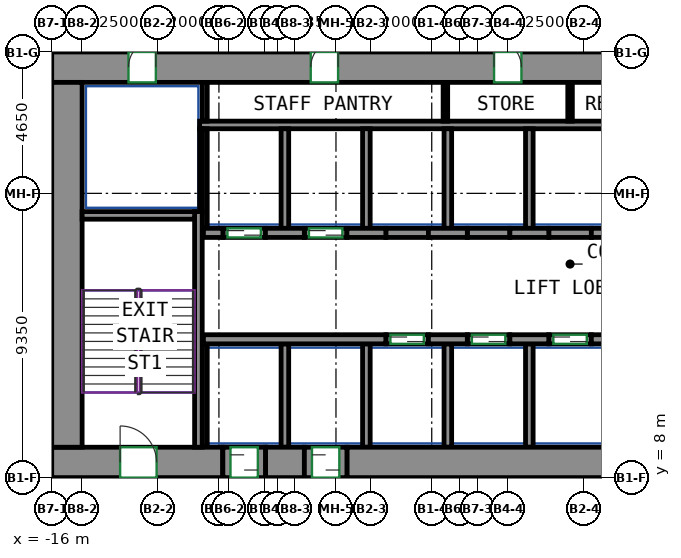
"""IFC4 building model, lengths in metres.
Left out: names, types, materials, properties, quantities, classifications, styles, units other than length and angle.
Written with IfcOpenShell. Run it as: python <this file> out.ifc"""

import sys

from ifc_helpers import new_model, si_unit, direction, frame, frame_2d, origin, place, context, subcontext, project, spatial, rectangle, extrude, source, transform, mapped, element, fill, save


model = new_model("IFC4")
c1 = context("Model", 3, precision=1e-05, world=origin(), true_north=direction((0.0, 1.0)))
c2 = subcontext(c1, "Body", "Model", "MODEL_VIEW")
j1 = project(units=[si_unit("LENGTHUNIT", "METRE"), si_unit("PLANEANGLEUNIT", "RADIAN")], contexts=[c1])
p1 = place(None, origin())
s1 = spatial("IfcSite", under=j1, at=p1, CompositionType="ELEMENT")
p2 = place(p1, origin())
s2 = spatial("IfcBuilding", under=s1, at=p2, CompositionType="ELEMENT")
p3 = place(p2, frame((0.0, 0.0, 18.0)))
s3 = spatial("IfcBuildingStorey", under=s2, at=p3, CompositionType="ELEMENT", Elevation=18.0)
m1 = source(origin(), c2, "Body", "SweptSolid", [
    extrude(rectangle(XDim=5.63, YDim=1.0, at=frame_2d((2.815, 0.0))), origin(), (0.0, 0.0, 1.0), 4.1),
])
p4 = place(p3, frame((-16.0, 8.5, 0.0), z_axis=(0.0, 0.0, 1.0), x_axis=(1.0, 0.0, 0.0)))
e1 = element("IfcWall", 1, at=p4, inside=s3, PredefinedType="SHEAR", context=c2, shape_type="MappedRepresentation", body=[
    mapped(m1, transform((0.0, 0.0, 0.0))),
])
p5 = place(p4, frame((2.25, 0.0, 0.0)))
e2 = element("IfcOpeningElement", 2, at=p5, cuts=e1, PredefinedType="OPENING", context=c2, shape_type="SweptSolid", body=[
    extrude(rectangle(XDim=1.2, YDim=2.1, at=frame_2d((0.6, 1.05))), frame((0.0, 0.51, 0.0), z_axis=(0.0, -1.0, 0.0), x_axis=(1.0, 0.0, 0.0)), (0.0, 0.0, 1.0), 1.02),
])
m2 = source(origin(), c2, "Body", "SweptSolid", [
    extrude(rectangle(XDim=1.28, YDim=1.0, at=frame_2d((0.64, 0.0))), origin(), (0.0, 0.0, 1.0), 4.1),
])
p6 = place(p3, frame((-8.97, 8.5, 0.0), z_axis=(0.0, 0.0, 1.0), x_axis=(1.0, 0.0, 0.0)))
e3 = element("IfcWall", 3, at=p6, inside=s3, PredefinedType="SHEAR", context=c2, shape_type="MappedRepresentation", body=[
    mapped(m2, transform((0.0, 0.0, 0.0))),
])
m3 = source(origin(), c2, "Body", "SweptSolid", [
    extrude(rectangle(XDim=14.18, YDim=1.0, at=frame_2d((7.09, 0.0))), origin(), (0.0, 0.0, 1.0), 4.1),
])
p7 = place(p3, frame((-6.29, 8.5, 0.0), z_axis=(0.0, 0.0, 1.0), x_axis=(1.0, 0.0, 0.0)))
e4 = element("IfcWall", 4, at=p7, inside=s3, PredefinedType="SHEAR", context=c2, shape_type="MappedRepresentation", body=[
    mapped(m3, transform((0.0, 0.0, 0.0))),
])
m4 = source(origin(), c2, "Body", "SweptSolid", [
    extrude(rectangle(XDim=34.1, YDim=1.0, at=frame_2d((17.05, 0.0))), origin(), (0.0, 0.0, 1.0), 4.1),
])
p8 = place(p3, frame((-16.0, 21.5, 0.0), z_axis=(0.0, 0.0, 1.0), x_axis=(1.0, 0.0, 0.0)))
e5 = element("IfcWall", 5, at=p8, inside=s3, PredefinedType="SHEAR", context=c2, shape_type="MappedRepresentation", body=[
    mapped(m4, transform((0.0, 0.0, 0.0))),
])
p9 = place(p8, frame((8.52, 0.0, 0.0)))
e6 = element("IfcOpeningElement", 6, at=p9, cuts=e5, PredefinedType="OPENING", context=c2, shape_type="SweptSolid", body=[
    extrude(rectangle(XDim=0.9, YDim=2.1, at=frame_2d((0.45, 1.05))), frame((0.0, 0.51, 0.0), z_axis=(0.0, -1.0, 0.0), x_axis=(1.0, 0.0, 0.0)), (0.0, 0.0, 1.0), 1.02),
])
p10 = place(p8, frame((14.55, 0.0, 0.0)))
e7 = element("IfcOpeningElement", 7, at=p10, cuts=e5, PredefinedType="OPENING", context=c2, shape_type="SweptSolid", body=[
    extrude(rectangle(XDim=0.9, YDim=2.1, at=frame_2d((0.45, 1.05))), frame((0.0, 0.51, 0.0), z_axis=(0.0, -1.0, 0.0), x_axis=(1.0, 0.0, 0.0)), (0.0, 0.0, 1.0), 1.02),
])
p11 = place(p8, frame((19.374, 0.0, 0.0)))
e8 = element("IfcOpeningElement", 8, at=p11, cuts=e5, PredefinedType="OPENING", context=c2, shape_type="SweptSolid", body=[
    extrude(rectangle(XDim=0.9, YDim=2.1, at=frame_2d((0.45, 1.05))), frame((0.0, 0.51, 0.0), z_axis=(0.0, -1.0, 0.0), x_axis=(1.0, 0.0, 0.0)), (0.0, 0.0, 1.0), 1.02),
])
p12 = place(p8, frame((25.404, 0.0, 0.0)))
e9 = element("IfcOpeningElement", 9, at=p12, cuts=e5, PredefinedType="OPENING", context=c2, shape_type="SweptSolid", body=[
    extrude(rectangle(XDim=0.9, YDim=2.1, at=frame_2d((0.45, 1.05))), frame((0.0, 0.51, 0.0), z_axis=(0.0, -1.0, 0.0), x_axis=(1.0, 0.0, 0.0)), (0.0, 0.0, 1.0), 1.02),
])
p13 = place(p8, frame((2.525, 0.0, 0.0)))
e10 = element("IfcOpeningElement", 10, at=p13, cuts=e5, PredefinedType="OPENING", context=c2, shape_type="SweptSolid", body=[
    extrude(rectangle(XDim=0.9, YDim=2.1, at=frame_2d((0.45, 1.05))), frame((0.0, 0.51, 0.0), z_axis=(0.0, -1.0, 0.0), x_axis=(1.0, 0.0, 0.0)), (0.0, 0.0, 1.0), 1.02),
])
p14 = place(p8, frame((30.675, 0.0, 0.0)))
e11 = element("IfcOpeningElement", 11, at=p14, cuts=e5, PredefinedType="OPENING", context=c2, shape_type="SweptSolid", body=[
    extrude(rectangle(XDim=0.9, YDim=2.1, at=frame_2d((0.45, 1.05))), frame((0.0, 0.51, 0.0), z_axis=(0.0, -1.0, 0.0), x_axis=(1.0, 0.0, 0.0)), (0.0, 0.0, 1.0), 1.02),
])
m5 = source(origin(), c2, "Body", "SweptSolid", [
    extrude(rectangle(XDim=12.0, YDim=1.0, at=frame_2d((6.0, 0.0))), origin(), (0.0, 0.0, 1.0), 4.1),
])
p15 = place(p3, frame((-15.5, 9.0, 0.0), z_axis=(0.0, 0.0, 1.0), x_axis=(0.0, 1.0, 0.0)))
e12 = element("IfcWall", 12, at=p15, inside=s3, PredefinedType="SHEAR", context=c2, shape_type="MappedRepresentation", body=[
    mapped(m5, transform((0.0, 0.0, 0.0))),
])
m6 = source(origin(), c2, "Body", "SweptSolid", [
    extrude(rectangle(XDim=7.75, YDim=0.25, at=frame_2d((3.875, 0.0))), origin(), (0.0, 0.0, 1.0), 4.1),
])
p16 = place(p3, frame((-11.175, 9.0, 0.0), z_axis=(0.0, 0.0, 1.0), x_axis=(0.0, 1.0, 0.0)))
e13 = element("IfcWall", 13, at=p16, inside=s3, PredefinedType="SHEAR", context=c2, shape_type="MappedRepresentation", body=[
    mapped(m6, transform((0.0, 0.0, 0.0))),
])
m7 = source(origin(), c2, "Body", "SweptSolid", [
    extrude(rectangle(XDim=3.7, YDim=0.25, at=frame_2d((1.85, 0.0))), origin(), (0.0, 0.0, 1.0), 4.1),
])
p17 = place(p3, frame((-15.0, 16.625, 0.0), z_axis=(0.0, 0.0, 1.0), x_axis=(1.0, 0.0, 0.0)))
e14 = element("IfcWall", 14, at=p17, inside=s3, PredefinedType="SHEAR", context=c2, shape_type="MappedRepresentation", body=[
    mapped(m7, transform((0.0, 0.0, 0.0))),
])
m8 = source(origin(), c2, "Body", "SweptSolid", [
    extrude(rectangle(XDim=6.0, YDim=0.3, at=frame_2d((3.0, 0.0))), origin(), (0.0, 0.0, 1.0), 4.1),
])
p18 = place(p3, frame((-11.01, 12.55, 0.0), z_axis=(0.0, 0.0, 1.0), x_axis=(1.0, 0.0, 0.0)))
e15 = element("IfcWall", 15, at=p18, inside=s3, PredefinedType="SHEAR", context=c2, shape_type="MappedRepresentation", body=[
    mapped(m8, transform((0.0, 0.0, 0.0))),
])
m9 = source(origin(), c2, "Body", "SweptSolid", [
    extrude(rectangle(XDim=1.28, YDim=0.3, at=frame_2d((0.64, 0.0))), origin(), (0.0, 0.0, 1.0), 4.1),
])
for number, where, z_axis, x_axis in (
    (16, (-3.61, 12.55, 0.0), (0.0, 0.0, 1.0), (1.0, 0.0, 0.0)),
    (17, (-0.93, 12.55, 0.0), (0.0, 0.0, 1.0), (1.0, 0.0, 0.0)),
    (18, (1.75, 12.55, 0.0), (0.0, 0.0, 1.0), (1.0, 0.0, 0.0)),
):
    element("IfcWall", number, at=place(p3, frame(where, z_axis=z_axis, x_axis=x_axis)), inside=s3, PredefinedType="SHEAR", context=c2, shape_type="MappedRepresentation", body=[
        mapped(m9, transform((0.0, 0.0, 0.0))),
    ])
m10 = source(origin(), c2, "Body", "SweptSolid", [
    extrude(rectangle(XDim=0.64, YDim=0.3, at=frame_2d((0.32, 0.0))), origin(), (0.0, 0.0, 1.0), 4.1),
])
p19 = place(p3, frame((-11.01, 16.05, 0.0), z_axis=(0.0, 0.0, 1.0), x_axis=(1.0, 0.0, 0.0)))
e19 = element("IfcWall", 19, at=p19, inside=s3, PredefinedType="SHEAR", context=c2, shape_type="MappedRepresentation", body=[
    mapped(m10, transform((0.0, 0.0, 0.0))),
])
for number, where, z_axis, x_axis in (
    (20, (-8.97, 16.05, 0.0), (0.0, 0.0, 1.0), (1.0, 0.0, 0.0)),
    (21, (-6.29, 16.05, 0.0), (0.0, 0.0, 1.0), (1.0, 0.0, 0.0)),
    (22, (-3.61, 16.05, 0.0), (0.0, 0.0, 1.0), (1.0, 0.0, 0.0)),
    (23, (-0.93, 16.05, 0.0), (0.0, 0.0, 1.0), (1.0, 0.0, 0.0)),
    (24, (1.75, 16.05, 0.0), (0.0, 0.0, 1.0), (1.0, 0.0, 0.0)),
):
    element("IfcWall", number, at=place(p3, frame(where, z_axis=z_axis, x_axis=x_axis)), inside=s3, PredefinedType="SHEAR", context=c2, shape_type="MappedRepresentation", body=[
        mapped(m9, transform((0.0, 0.0, 0.0))),
    ])
m11 = source(origin(), c2, "Body", "SweptSolid", [
    extrude(rectangle(XDim=1.4, YDim=1.0, at=frame_2d((0.7, 0.0))), origin(), (0.0, 0.0, 1.0), 0.2),
])
p20 = place(p3, frame((-10.37, 8.5, 3.9), z_axis=(0.0, 0.0, 1.0), x_axis=(1.0, 0.0, 0.0)))
e25 = element("IfcWall", 25, at=p20, inside=s3, PredefinedType="SHEAR", context=c2, shape_type="MappedRepresentation", body=[
    mapped(m11, transform((0.0, 0.0, 0.0))),
])
m12 = source(origin(), c2, "Body", "SweptSolid", [
    extrude(rectangle(XDim=1.4, YDim=0.3, at=frame_2d((0.7, 0.0))), origin(), (0.0, 0.0, 1.0), 4.1),
])
p21 = place(p3, frame((-5.01, 12.55, 0.0), z_axis=(0.0, 0.0, 1.0), x_axis=(1.0, 0.0, 0.0)))
e26 = element("IfcWall", 26, at=p21, inside=s3, PredefinedType="PARTITIONING", context=c2, shape_type="MappedRepresentation", body=[
    mapped(m12, transform((0.0, 0.0, 0.0))),
])
p22 = place(p21, frame((0.15, 0.0, 0.0)))
e27 = element("IfcOpeningElement", 27, at=p22, cuts=e26, PredefinedType="OPENING", context=c2, shape_type="SweptSolid", body=[
    extrude(rectangle(XDim=1.1, YDim=2.1, at=frame_2d((0.55, 1.05))), frame((0.0, 0.16, 0.0), z_axis=(0.0, -1.0, 0.0), x_axis=(1.0, 0.0, 0.0)), (0.0, 0.0, 1.0), 0.32),
])
m13 = source(origin(), c2, "Body", "SweptSolid", [
    extrude(rectangle(XDim=1.4, YDim=0.3, at=frame_2d((0.7, 0.0))), origin(), (0.0, 0.0, 1.0), 4.1),
])
p23 = place(p3, frame((-2.33, 12.55, 0.0), z_axis=(0.0, 0.0, 1.0), x_axis=(1.0, 0.0, 0.0)))
e28 = element("IfcWall", 28, at=p23, inside=s3, PredefinedType="PARTITIONING", context=c2, shape_type="MappedRepresentation", body=[
    mapped(m13, transform((0.0, 0.0, 0.0))),
])
p24 = place(p23, frame((0.15, 0.0, 0.0)))
e29 = element("IfcOpeningElement", 29, at=p24, cuts=e28, PredefinedType="OPENING", context=c2, shape_type="SweptSolid", body=[
    extrude(rectangle(XDim=1.1, YDim=2.1, at=frame_2d((0.55, 1.05))), frame((0.0, 0.16, 0.0), z_axis=(0.0, -1.0, 0.0), x_axis=(1.0, 0.0, 0.0)), (0.0, 0.0, 1.0), 0.32),
])
p25 = place(p3, frame((0.35, 12.55, 0.0), z_axis=(0.0, 0.0, 1.0), x_axis=(1.0, 0.0, 0.0)))
e30 = element("IfcWall", 30, at=p25, inside=s3, PredefinedType="PARTITIONING", context=c2, shape_type="MappedRepresentation", body=[
    mapped(m12, transform((0.0, 0.0, 0.0))),
])
p26 = place(p25, frame((0.15, 0.0, 0.0)))
e31 = element("IfcOpeningElement", 31, at=p26, cuts=e30, PredefinedType="OPENING", context=c2, shape_type="SweptSolid", body=[
    extrude(rectangle(XDim=1.1, YDim=2.1, at=frame_2d((0.55, 1.05))), frame((0.0, 0.16, 0.0), z_axis=(0.0, -1.0, 0.0), x_axis=(1.0, 0.0, 0.0)), (0.0, 0.0, 1.0), 0.32),
])
p27 = place(p3, frame((-10.37, 16.05, 0.0), z_axis=(0.0, 0.0, 1.0), x_axis=(1.0, 0.0, 0.0)))
e32 = element("IfcWall", 32, at=p27, inside=s3, PredefinedType="PARTITIONING", context=c2, shape_type="MappedRepresentation", body=[
    mapped(m13, transform((0.0, 0.0, 0.0))),
])
p28 = place(p27, frame((0.15, 0.0, 0.0)))
e33 = element("IfcOpeningElement", 33, at=p28, cuts=e32, PredefinedType="OPENING", context=c2, shape_type="SweptSolid", body=[
    extrude(rectangle(XDim=1.1, YDim=2.1, at=frame_2d((0.55, 1.05))), frame((0.0, 0.16, 0.0), z_axis=(0.0, -1.0, 0.0), x_axis=(1.0, 0.0, 0.0)), (0.0, 0.0, 1.0), 0.32),
])
p29 = place(p3, frame((-7.69, 16.05, 0.0), z_axis=(0.0, 0.0, 1.0), x_axis=(1.0, 0.0, 0.0)))
e34 = element("IfcWall", 34, at=p29, inside=s3, PredefinedType="PARTITIONING", context=c2, shape_type="MappedRepresentation", body=[
    mapped(m12, transform((0.0, 0.0, 0.0))),
])
p30 = place(p29, frame((0.15, 0.0, 0.0)))
e35 = element("IfcOpeningElement", 35, at=p30, cuts=e34, PredefinedType="OPENING", context=c2, shape_type="SweptSolid", body=[
    extrude(rectangle(XDim=1.1, YDim=2.1, at=frame_2d((0.55, 1.05))), frame((0.0, 0.16, 0.0), z_axis=(0.0, -1.0, 0.0), x_axis=(1.0, 0.0, 0.0)), (0.0, 0.0, 1.0), 0.32),
])
p31 = place(p3, frame((-5.01, 16.05, 0.0), z_axis=(0.0, 0.0, 1.0), x_axis=(1.0, 0.0, 0.0)))
e36 = element("IfcWall", 36, at=p31, inside=s3, PredefinedType="PARTITIONING", context=c2, shape_type="MappedRepresentation", body=[
    mapped(m12, transform((0.0, 0.0, 0.0))),
])
p32 = place(p3, frame((-2.33, 16.05, 0.0), z_axis=(0.0, 0.0, 1.0), x_axis=(1.0, 0.0, 0.0)))
e37 = element("IfcWall", 37, at=p32, inside=s3, PredefinedType="PARTITIONING", context=c2, shape_type="MappedRepresentation", body=[
    mapped(m13, transform((0.0, 0.0, 0.0))),
])
p33 = place(p3, frame((0.35, 16.05, 0.0), z_axis=(0.0, 0.0, 1.0), x_axis=(1.0, 0.0, 0.0)))
e38 = element("IfcWall", 38, at=p33, inside=s3, PredefinedType="PARTITIONING", context=c2, shape_type="MappedRepresentation", body=[
    mapped(m12, transform((0.0, 0.0, 0.0))),
])
m14 = source(origin(), c2, "Body", "SweptSolid", [
    extrude(rectangle(XDim=24.37, YDim=0.25, at=frame_2d((12.185, 0.0))), origin(), (0.0, 0.0, 1.0), 4.1),
])
p34 = place(p3, frame((-11.135, 19.6, 0.0), z_axis=(0.0, 0.0, 1.0), x_axis=(1.0, 0.0, 0.0)))
e39 = element("IfcWall", 39, at=p34, inside=s3, PredefinedType="PARTITIONING", context=c2, shape_type="MappedRepresentation", body=[
    mapped(m14, transform((0.0, 0.0, 0.0))),
])
m15 = source(origin(), c2, "Body", "SweptSolid", [
    extrude(rectangle(XDim=3.275, YDim=0.165, at=frame_2d((1.638, 0.0))), origin(), (0.0, 0.0, 1.0), 4.1),
])
p35 = place(p3, frame((-10.968, 16.2, 0.0), z_axis=(0.0, 0.0, 1.0), x_axis=(0.0, 1.0, 0.0)))
e40 = element("IfcWall", 40, at=p35, inside=s3, PredefinedType="PARTITIONING", context=c2, shape_type="MappedRepresentation", body=[
    mapped(m15, transform((0.0, 0.0, 0.0))),
])
m16 = source(origin(), c2, "Body", "SweptSolid", [
    extrude(rectangle(XDim=1.275, YDim=0.165, at=frame_2d((0.637, 0.0))), origin(), (0.0, 0.0, 1.0), 4.1),
])
p36 = place(p3, frame((-10.968, 19.725, 0.0), z_axis=(0.0, 0.0, 1.0), x_axis=(0.0, 1.0, 0.0)))
e41 = element("IfcWall", 41, at=p36, inside=s3, PredefinedType="PARTITIONING", context=c2, shape_type="MappedRepresentation", body=[
    mapped(m16, transform((0.0, 0.0, 0.0))),
])
m17 = source(origin(), c2, "Body", "SweptSolid", [
    extrude(rectangle(XDim=3.275, YDim=0.25, at=frame_2d((1.638, 0.0))), origin(), (0.0, 0.0, 1.0), 4.1),
])
p37 = place(p3, frame((-0.29, 16.2, 0.0), z_axis=(0.0, 0.0, 1.0), x_axis=(0.0, 1.0, 0.0)))
e42 = element("IfcWall", 42, at=p37, inside=s3, PredefinedType="PARTITIONING", context=c2, shape_type="MappedRepresentation", body=[
    mapped(m17, transform((0.0, 0.0, 0.0))),
])
m18 = source(origin(), c2, "Body", "SweptSolid", [
    extrude(rectangle(XDim=2.725, YDim=0.085, at=frame_2d((1.363, 0.0))), origin(), (0.0, 0.0, 1.0), 4.1),
])
p38 = place(p3, frame((-11.093, 16.75, 0.0), z_axis=(0.0, 0.0, 1.0), x_axis=(0.0, 1.0, 0.0)))
e43 = element("IfcWall", 43, at=p38, inside=s3, PredefinedType="PARTITIONING", context=c2, shape_type="MappedRepresentation", body=[
    mapped(m18, transform((0.0, 0.0, 0.0))),
])
for number, where, z_axis, x_axis in (
    (44, (-2.97, 16.2, 0.0), (0.0, 0.0, 1.0), (0.0, 1.0, 0.0)),
    (45, (-5.65, 16.2, 0.0), (0.0, 0.0, 1.0), (0.0, 1.0, 0.0)),
    (46, (-8.33, 16.2, 0.0), (0.0, 0.0, 1.0), (0.0, 1.0, 0.0)),
):
    element("IfcWall", number, at=place(p3, frame(where, z_axis=z_axis, x_axis=x_axis)), inside=s3, PredefinedType="PARTITIONING", context=c2, shape_type="MappedRepresentation", body=[
        mapped(m17, transform((0.0, 0.0, 0.0))),
    ])
m19 = source(origin(), c2, "Body", "SweptSolid", [
    extrude(rectangle(XDim=3.4, YDim=0.25, at=frame_2d((1.7, 0.0))), origin(), (0.0, 0.0, 1.0), 4.1),
])
p39 = place(p3, frame((-0.29, 9.0, 0.0), z_axis=(0.0, 0.0, 1.0), x_axis=(0.0, 1.0, 0.0)))
e47 = element("IfcWall", 47, at=p39, inside=s3, PredefinedType="PARTITIONING", context=c2, shape_type="MappedRepresentation", body=[
    mapped(m19, transform((0.0, 0.0, 0.0))),
])
m20 = source(origin(), c2, "Body", "SweptSolid", [
    extrude(rectangle(XDim=3.4, YDim=0.165, at=frame_2d((1.7, 0.0))), origin(), (0.0, 0.0, 1.0), 4.1),
])
p40 = place(p3, frame((-10.968, 9.0, 0.0), z_axis=(0.0, 0.0, 1.0), x_axis=(0.0, 1.0, 0.0)))
e48 = element("IfcWall", 48, at=p40, inside=s3, PredefinedType="PARTITIONING", context=c2, shape_type="MappedRepresentation", body=[
    mapped(m20, transform((0.0, 0.0, 0.0))),
])
for number, where, z_axis, x_axis in (
    (49, (-2.97, 9.0, 0.0), (0.0, 0.0, 1.0), (0.0, 1.0, 0.0)),
    (50, (-5.65, 9.0, 0.0), (0.0, 0.0, 1.0), (0.0, 1.0, 0.0)),
    (51, (-8.33, 9.0, 0.0), (0.0, 0.0, 1.0), (0.0, 1.0, 0.0)),
):
    element("IfcWall", number, at=place(p3, frame(where, z_axis=z_axis, x_axis=x_axis)), inside=s3, PredefinedType="PARTITIONING", context=c2, shape_type="MappedRepresentation", body=[
        mapped(m19, transform((0.0, 0.0, 0.0))),
    ])
m21 = source(origin(), c2, "Body", "SweptSolid", [
    extrude(rectangle(XDim=1.275, YDim=0.15, at=frame_2d((0.637, 0.0))), origin(), (0.0, 0.0, 1.0), 4.1),
])
for number, where, z_axis, x_axis in (
    (52, (-3.05, 19.725, 0.0), (0.0, 0.0, 1.0), (0.0, 1.0, 0.0)),
    (53, (1.05, 19.725, 0.0), (0.0, 0.0, 1.0), (0.0, 1.0, 0.0)),
):
    element("IfcWall", number, at=place(p3, frame(where, z_axis=z_axis, x_axis=x_axis)), inside=s3, PredefinedType="PARTITIONING", context=c2, shape_type="MappedRepresentation", body=[
        mapped(m21, transform((0.0, 0.0, 0.0))),
    ])
m22 = source(origin(), c2, "Body", "SweptSolid", [
    extrude(rectangle(XDim=1.4, YDim=1.0, at=frame_2d((0.7, 0.0))), origin(), (0.0, 0.0, 1.0), 2.7),
])
p41 = place(p3, frame((-10.37, 8.5, 0.0), z_axis=(0.0, 0.0, 1.0), x_axis=(1.0, 0.0, 0.0)))
e54 = element("IfcWall", 54, at=p41, inside=s3, PredefinedType="PARTITIONING", context=c2, shape_type="MappedRepresentation", body=[
    mapped(m22, transform((0.0, 0.0, 0.0))),
])
p42 = place(p41, frame((0.25, 0.0, 0.0)))
e55 = element("IfcOpeningElement", 55, at=p42, cuts=e54, PredefinedType="OPENING", context=c2, shape_type="SweptSolid", body=[
    extrude(rectangle(XDim=0.9, YDim=2.1, at=frame_2d((0.45, 1.05))), frame((0.0, 0.51, 0.0), z_axis=(0.0, -1.0, 0.0), x_axis=(1.0, 0.0, 0.0)), (0.0, 0.0, 1.0), 1.02),
])
m23 = source(origin(), c2, "Body", "SweptSolid", [
    extrude(rectangle(XDim=1.4, YDim=1.0, at=frame_2d((0.7, 0.0))), origin(), (0.0, 0.0, 1.0), 2.7),
])
p43 = place(p3, frame((-7.69, 8.5, 0.0), z_axis=(0.0, 0.0, 1.0), x_axis=(1.0, 0.0, 0.0)))
e56 = element("IfcWall", 56, at=p43, inside=s3, PredefinedType="PARTITIONING", context=c2, shape_type="MappedRepresentation", body=[
    mapped(m23, transform((0.0, 0.0, 0.0))),
])
p44 = place(p43, frame((0.25, 0.0, 0.0)))
e57 = element("IfcOpeningElement", 57, at=p44, cuts=e56, PredefinedType="OPENING", context=c2, shape_type="SweptSolid", body=[
    extrude(rectangle(XDim=0.9, YDim=2.1, at=frame_2d((0.45, 1.05))), frame((0.0, 0.51, 0.0), z_axis=(0.0, -1.0, 0.0), x_axis=(1.0, 0.0, 0.0)), (0.0, 0.0, 1.0), 1.02),
])
p45 = place(p42, origin())
e58 = element("IfcDoor", 58, at=p45, inside=s3, OperationType="SLIDING_TO_LEFT", PredefinedType="DOOR", context=c2, shape_type="SweptSolid", body=[
    extrude(rectangle(XDim=0.9, YDim=2.1, at=frame_2d((0.45, 1.05))), frame((0.0, 0.405, 0.0), z_axis=(0.0, -1.0, 0.0), x_axis=(1.0, 0.0, 0.0)), (0.0, 0.0, 1.0), 0.05),
])
fill(e55, e58)
p46 = place(p44, origin())
e59 = element("IfcDoor", 59, at=p46, inside=s3, OperationType="SLIDING_TO_RIGHT", PredefinedType="DOOR", context=c2, shape_type="SweptSolid", body=[
    extrude(rectangle(XDim=0.9, YDim=2.1, at=frame_2d((0.45, 1.05))), frame((0.0, 0.405, 0.0), z_axis=(0.0, -1.0, 0.0), x_axis=(1.0, 0.0, 0.0)), (0.0, 0.0, 1.0), 0.05),
])
fill(e57, e59)
p47 = place(p22, origin())
e60 = element("IfcDoor", 60, at=p47, inside=s3, OperationType="DOUBLE_DOOR_SLIDING", PredefinedType="DOOR", context=c2, shape_type="SweptSolid", body=[
    extrude(rectangle(XDim=1.1, YDim=2.1, at=frame_2d((0.55, 1.05))), frame((0.0, 0.025, 0.0), z_axis=(0.0, -1.0, 0.0), x_axis=(1.0, 0.0, 0.0)), (0.0, 0.0, 1.0), 0.05),
])
fill(e27, e60)
p48 = place(p24, origin())
e61 = element("IfcDoor", 61, at=p48, inside=s3, OperationType="DOUBLE_DOOR_SLIDING", PredefinedType="DOOR", context=c2, shape_type="SweptSolid", body=[
    extrude(rectangle(XDim=1.1, YDim=2.1, at=frame_2d((0.55, 1.05))), frame((0.0, 0.025, 0.0), z_axis=(0.0, -1.0, 0.0), x_axis=(1.0, 0.0, 0.0)), (0.0, 0.0, 1.0), 0.05),
])
fill(e29, e61)
p49 = place(p26, origin())
e62 = element("IfcDoor", 62, at=p49, inside=s3, OperationType="DOUBLE_DOOR_SLIDING", PredefinedType="DOOR", context=c2, shape_type="SweptSolid", body=[
    extrude(rectangle(XDim=1.1, YDim=2.1, at=frame_2d((0.55, 1.05))), frame((0.0, 0.025, 0.0), z_axis=(0.0, -1.0, 0.0), x_axis=(1.0, 0.0, 0.0)), (0.0, 0.0, 1.0), 0.05),
])
fill(e31, e62)
p50 = place(p28, origin())
e63 = element("IfcDoor", 63, at=p50, inside=s3, OperationType="DOUBLE_DOOR_SLIDING", PredefinedType="DOOR", context=c2, shape_type="SweptSolid", body=[
    extrude(rectangle(XDim=1.1, YDim=2.1, at=frame_2d((0.55, 1.05))), frame((0.0, 0.025, 0.0), z_axis=(0.0, -1.0, 0.0), x_axis=(1.0, 0.0, 0.0)), (0.0, 0.0, 1.0), 0.05),
])
fill(e33, e63)
p51 = place(p30, origin())
e64 = element("IfcDoor", 64, at=p51, inside=s3, OperationType="DOUBLE_DOOR_SLIDING", PredefinedType="DOOR", context=c2, shape_type="SweptSolid", body=[
    extrude(rectangle(XDim=1.1, YDim=2.1, at=frame_2d((0.55, 1.05))), frame((0.0, 0.025, 0.0), z_axis=(0.0, -1.0, 0.0), x_axis=(1.0, 0.0, 0.0)), (0.0, 0.0, 1.0), 0.05),
])
fill(e35, e64)
p52 = place(p9, origin())
e65 = element("IfcDoor", 65, at=p52, inside=s3, OperationType="SINGLE_SWING_RIGHT", PredefinedType="DOOR", context=c2, shape_type="SweptSolid", body=[
    extrude(rectangle(XDim=0.9, YDim=2.1, at=frame_2d((0.45, 1.05))), frame((0.0, -0.355, 0.0), z_axis=(0.0, -1.0, 0.0), x_axis=(1.0, 0.0, 0.0)), (0.0, 0.0, 1.0), 0.05),
])
fill(e6, e65)
p53 = place(p10, origin())
e66 = element("IfcDoor", 66, at=p53, inside=s3, OperationType="SINGLE_SWING_LEFT", PredefinedType="DOOR", context=c2, shape_type="SweptSolid", body=[
    extrude(rectangle(XDim=0.9, YDim=2.1, at=frame_2d((0.45, 1.05))), frame((0.0, -0.355, 0.0), z_axis=(0.0, -1.0, 0.0), x_axis=(1.0, 0.0, 0.0)), (0.0, 0.0, 1.0), 0.05),
])
fill(e7, e66)
p54 = place(p13, origin())
e67 = element("IfcDoor", 67, at=p54, inside=s3, OperationType="SINGLE_SWING_RIGHT", PredefinedType="DOOR", context=c2, shape_type="SweptSolid", body=[
    extrude(rectangle(XDim=0.9, YDim=2.1, at=frame_2d((0.45, 1.05))), frame((0.0, -0.355, 0.0), z_axis=(0.0, -1.0, 0.0), x_axis=(1.0, 0.0, 0.0)), (0.0, 0.0, 1.0), 0.05),
])
fill(e10, e67)
p55 = place(p5, origin())
e68 = element("IfcDoor", 68, at=p55, inside=s3, OperationType="DOUBLE_DOOR_SINGLE_SWING", PredefinedType="DOOR", context=c2, shape_type="SweptSolid", body=[
    extrude(rectangle(XDim=1.2, YDim=2.1, at=frame_2d((0.6, 1.05))), frame((0.0, 0.405, 0.0), z_axis=(0.0, -1.0, 0.0), x_axis=(1.0, 0.0, 0.0)), (0.0, 0.0, 1.0), 0.05),
])
fill(e2, e68)
save(model, sys.argv[1])
